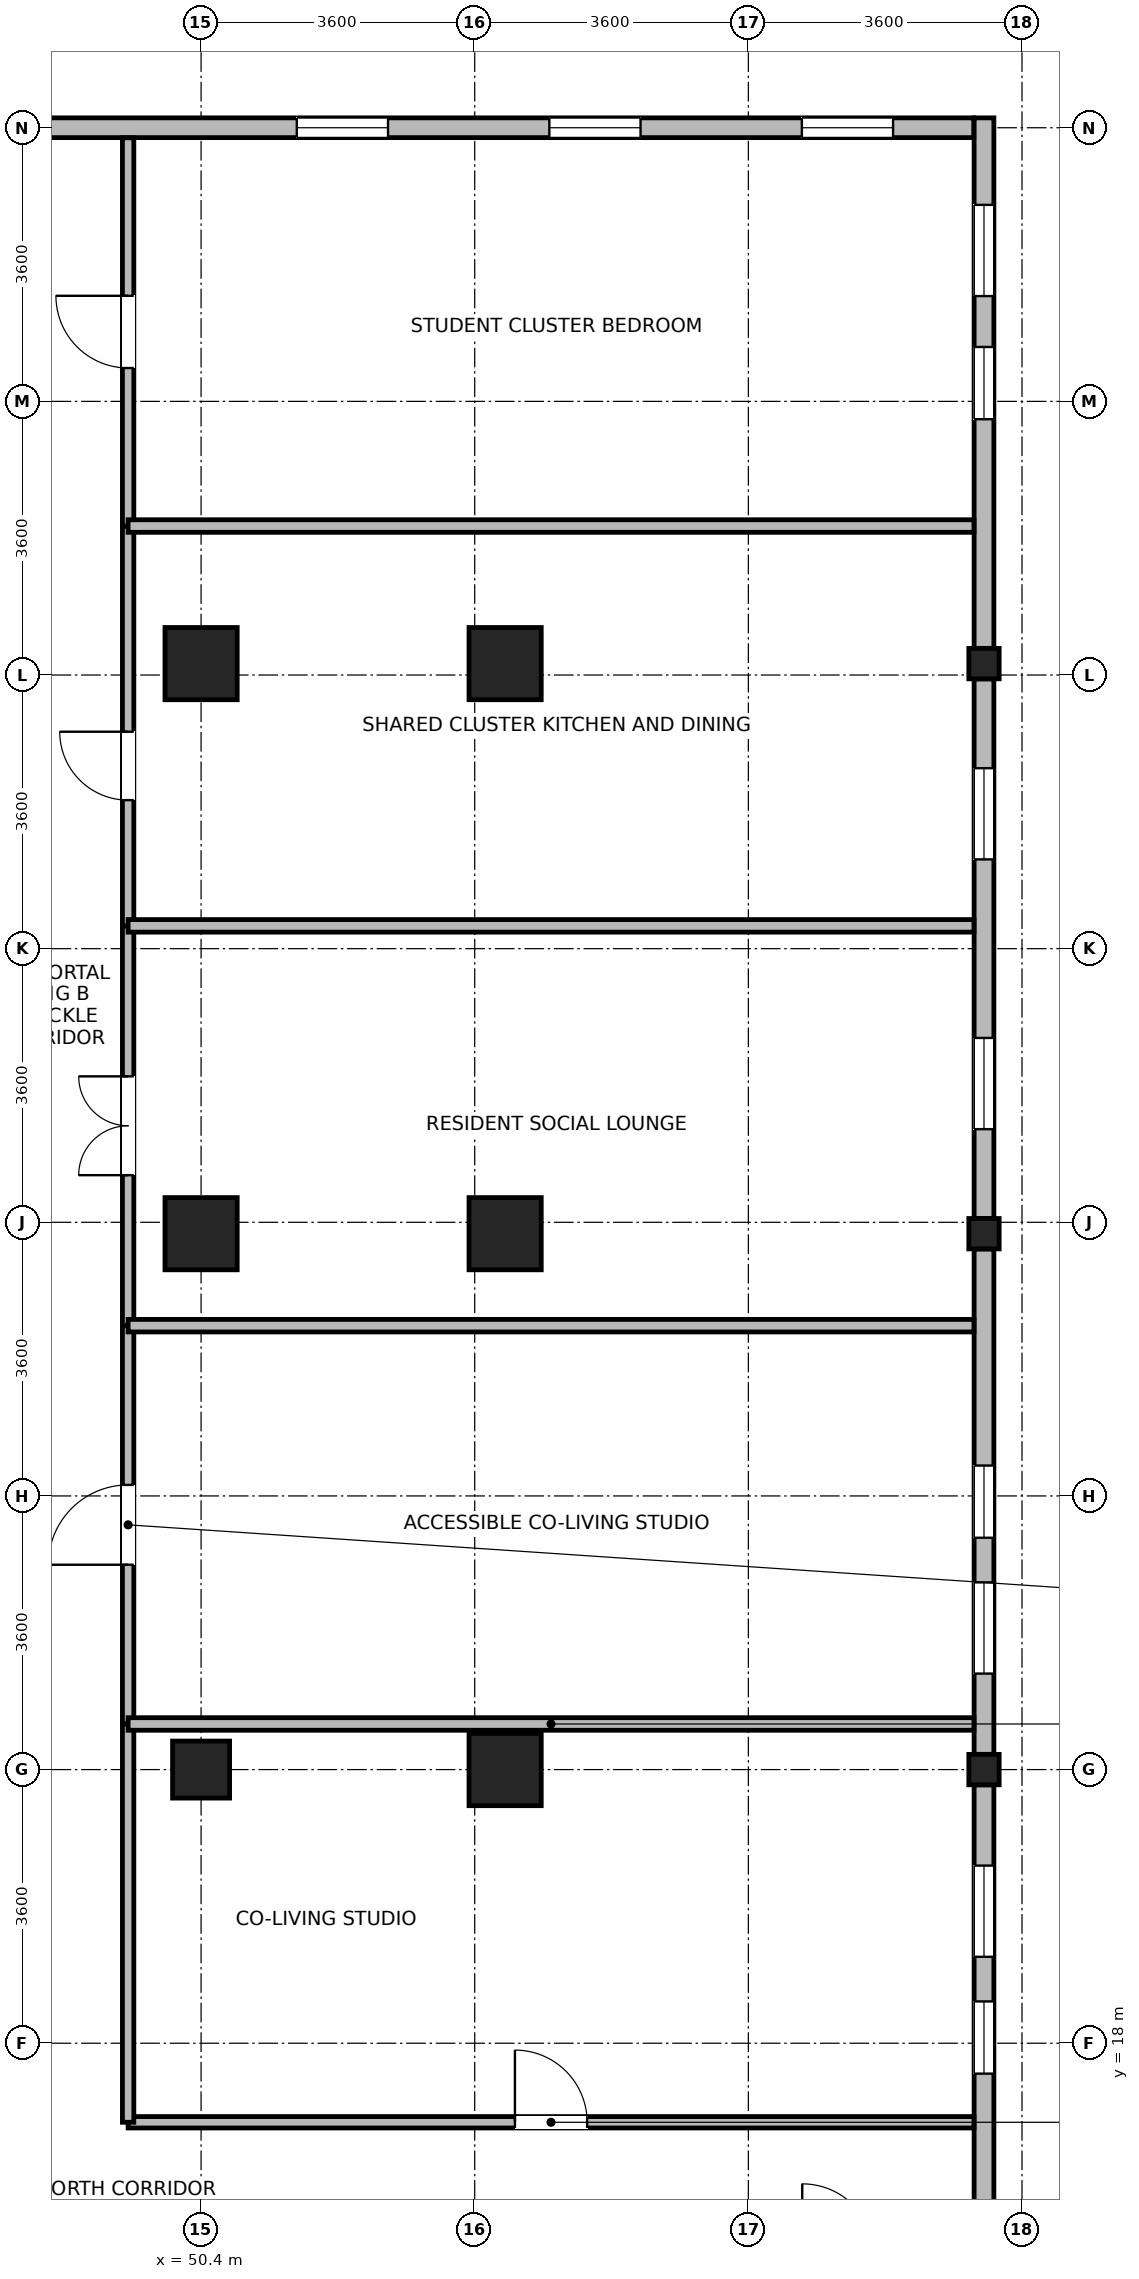
"""IFC4 building model, lengths in metres.
Left out: names, types, materials, properties, quantities, classifications, styles, units other than length and angle.
Written with IfcOpenShell. Run it as: python <this file> out.ifc"""

import sys

from ifc_helpers import new_model, si_unit, direction, frame, frame_2d, origin, origin_2d, place, context, subcontext, project, spatial, rectangle, i_section, extrude, source, transform, mapped, element, fill, save


model = new_model("IFC4")
c1 = context("Model", 3, precision=1e-05, world=origin(), true_north=direction((0.0, 1.0)))
c2 = subcontext(c1, "Body", "Model", "MODEL_VIEW")
j1 = project(units=[si_unit("LENGTHUNIT", "METRE"), si_unit("PLANEANGLEUNIT", "RADIAN")], contexts=[c1])
p1 = place(None, origin())
s1 = spatial("IfcSite", under=j1, at=p1, CompositionType="ELEMENT")
p2 = place(p1, origin())
s2 = spatial("IfcBuilding", under=s1, at=p2, CompositionType="ELEMENT")
p3 = place(p2, frame((0.0, 0.0, 235.1)))
s3 = spatial("IfcBuildingStorey", under=s2, at=p3, CompositionType="ELEMENT", Elevation=235.1)
m1 = source(origin(), c2, "Body", "SweptSolid", [
    extrude(rectangle(XDim=0.75, YDim=0.75, at=origin_2d()), origin(), (0.0, 0.0, 1.0), 3.7),
])
p4 = place(p3, frame((50.4, 21.6, 0.0), z_axis=(0.0, 0.0, 1.0), x_axis=(1.0, 0.0, 0.0)))
e1 = element("IfcColumn", 1, at=p4, inside=s3, PredefinedType="PILASTER", context=c2, shape_type="MappedRepresentation", body=[
    mapped(m1, transform((0.0, 0.0, 0.0), x_axis=(1.0, 0.0, 0.0), y_axis=(0.0, 1.0, 0.0), z_axis=(0.0, 0.0, 1.0), scale=1.0)),
])
m2 = source(origin(), c2, "Body", "SweptSolid", [
    extrude(rectangle(XDim=0.95, YDim=0.95, at=origin_2d()), origin(), (0.0, 0.0, 1.0), 3.7),
])
for number, where, z_axis, x_axis in (
    (2, (50.4, 28.65, 0.0), (0.0, 0.0, 1.0), (1.0, 0.0, 0.0)),
    (3, (50.4, 36.15, 0.0), (0.0, 0.0, 1.0), (1.0, 0.0, 0.0)),
    (4, (54.4, 21.6, 0.0), (0.0, 0.0, 1.0), (1.0, 0.0, 0.0)),
    (5, (54.4, 28.65, 0.0), (0.0, 0.0, 1.0), (1.0, 0.0, 0.0)),
    (6, (54.4, 36.15, 0.0), (0.0, 0.0, 1.0), (1.0, 0.0, 0.0)),
):
    element("IfcColumn", number, at=place(p3, frame(where, z_axis=z_axis, x_axis=x_axis)), inside=s3, PredefinedType="COLUMN", context=c2, shape_type="MappedRepresentation", body=[
        mapped(m2, transform((0.0, 0.0, 0.0), x_axis=(1.0, 0.0, 0.0), y_axis=(0.0, 1.0, 0.0), z_axis=(0.0, 0.0, 1.0), scale=1.0)),
    ])
m3 = source(origin(), c2, "Body", "SweptSolid", [
    extrude(i_section(OverallWidth=0.399, OverallDepth=0.4, WebThickness=0.017, FlangeThickness=0.023, FilletRadius=0.015, at=origin_2d()), origin(), (0.0, 0.0, 1.0), 3.7),
])
for number, where, z_axis, x_axis in (
    (7, (60.7, 21.6, 0.0), (0.0, 0.0, 1.0), (1.0, 0.0, 0.0)),
    (8, (60.7, 28.65, 0.0), (0.0, 0.0, 1.0), (1.0, 0.0, 0.0)),
    (9, (60.7, 36.15, 0.0), (0.0, 0.0, 1.0), (1.0, 0.0, 0.0)),
):
    element("IfcColumn", number, at=place(p3, frame(where, z_axis=z_axis, x_axis=x_axis)), inside=s3, PredefinedType="COLUMN", context=c2, shape_type="MappedRepresentation", body=[
        mapped(m3, transform((0.0, 0.0, 0.0), x_axis=(1.0, 0.0, 0.0), y_axis=(0.0, 1.0, 0.0), z_axis=(0.0, 0.0, 1.0), scale=1.0)),
    ])
p5 = place(p3, frame((60.7, 21.399, 0.0), z_axis=(0.0, 0.0, 1.0), x_axis=(0.0, -1.0, 0.0)))
e10 = element("IfcWall", 10, at=p5, inside=s3, PredefinedType="STANDARD", context=c2, shape_type="SweptSolid", body=[
    extrude(rectangle(XDim=6.648, YDim=0.26, at=frame_2d((3.324, 0.0))), origin(), (0.0, 0.0, 1.0), 3.02),
])
p6 = place(p5, frame((1.062, 0.0, 0.85)))
e11 = element("IfcOpeningElement", 11, at=p6, cuts=e10, PredefinedType="OPENING", context=c2, shape_type="SweptSolid", body=[
    extrude(rectangle(XDim=1.2, YDim=1.75, at=frame_2d((0.6, 0.875))), frame((0.0, 0.14, 0.0), z_axis=(0.0, -1.0, 0.0), x_axis=(1.0, 0.0, 0.0)), (0.0, 0.0, 1.0), 0.28),
])
p7 = place(p5, frame((2.849, 0.0, 0.85)))
e12 = element("IfcOpeningElement", 12, at=p7, cuts=e10, PredefinedType="OPENING", context=c2, shape_type="SweptSolid", body=[
    extrude(rectangle(XDim=0.95, YDim=1.75, at=frame_2d((0.475, 0.875))), frame((0.0, 0.14, 0.0), z_axis=(0.0, -1.0, 0.0), x_axis=(1.0, 0.0, 0.0)), (0.0, 0.0, 1.0), 0.28),
])
p8 = place(p3, frame((60.7, 28.449, 0.0), z_axis=(0.0, 0.0, 1.0), x_axis=(0.0, -1.0, 0.0)))
e13 = element("IfcWall", 13, at=p8, inside=s3, PredefinedType="STANDARD", context=c2, shape_type="SweptSolid", body=[
    extrude(rectangle(XDim=6.648, YDim=0.26, at=frame_2d((3.324, 0.0))), origin(), (0.0, 0.0, 1.0), 3.02),
])
p9 = place(p8, frame((4.386, 0.0, 0.85)))
e14 = element("IfcOpeningElement", 14, at=p9, cuts=e13, PredefinedType="OPENING", context=c2, shape_type="SweptSolid", body=[
    extrude(rectangle(XDim=1.2, YDim=1.75, at=frame_2d((0.6, 0.875))), frame((0.0, 0.14, 0.0), z_axis=(0.0, -1.0, 0.0), x_axis=(1.0, 0.0, 0.0)), (0.0, 0.0, 1.0), 0.28),
])
p10 = place(p8, frame((2.849, 0.0, 0.85)))
e15 = element("IfcOpeningElement", 15, at=p10, cuts=e13, PredefinedType="OPENING", context=c2, shape_type="SweptSolid", body=[
    extrude(rectangle(XDim=0.95, YDim=1.75, at=frame_2d((0.475, 0.875))), frame((0.0, 0.14, 0.0), z_axis=(0.0, -1.0, 0.0), x_axis=(1.0, 0.0, 0.0)), (0.0, 0.0, 1.0), 0.28),
])
p11 = place(p3, frame((60.7, 35.949, 0.0), z_axis=(0.0, 0.0, 1.0), x_axis=(0.0, -1.0, 0.0)))
e16 = element("IfcWall", 16, at=p11, inside=s3, PredefinedType="STANDARD", context=c2, shape_type="SweptSolid", body=[
    extrude(rectangle(XDim=7.098, YDim=0.26, at=frame_2d((3.549, 0.0))), origin(), (0.0, 0.0, 1.0), 3.02),
])
p12 = place(p11, frame((1.175, 0.0, 0.85)))
e17 = element("IfcOpeningElement", 17, at=p12, cuts=e16, PredefinedType="OPENING", context=c2, shape_type="SweptSolid", body=[
    extrude(rectangle(XDim=1.2, YDim=1.75, at=frame_2d((0.6, 0.875))), frame((0.0, 0.14, 0.0), z_axis=(0.0, -1.0, 0.0), x_axis=(1.0, 0.0, 0.0)), (0.0, 0.0, 1.0), 0.28),
])
p13 = place(p11, frame((4.723, 0.0, 0.85)))
e18 = element("IfcOpeningElement", 18, at=p13, cuts=e16, PredefinedType="OPENING", context=c2, shape_type="SweptSolid", body=[
    extrude(rectangle(XDim=1.2, YDim=1.75, at=frame_2d((0.6, 0.875))), frame((0.0, 0.14, 0.0), z_axis=(0.0, -1.0, 0.0), x_axis=(1.0, 0.0, 0.0)), (0.0, 0.0, 1.0), 0.28),
])
p14 = place(p3, frame((60.7, 43.33, 0.0), z_axis=(0.0, 0.0, 1.0), x_axis=(0.0, -1.0, 0.0)))
e19 = element("IfcWall", 19, at=p14, inside=s3, PredefinedType="STANDARD", context=c2, shape_type="SweptSolid", body=[
    extrude(rectangle(XDim=6.979, YDim=0.26, at=frame_2d((3.49, 0.0))), origin(), (0.0, 0.0, 1.0), 3.42),
])
p15 = place(p14, frame((1.145, 0.0, 0.85)))
e20 = element("IfcOpeningElement", 20, at=p15, cuts=e19, PredefinedType="OPENING", context=c2, shape_type="SweptSolid", body=[
    extrude(rectangle(XDim=1.2, YDim=1.75, at=frame_2d((0.6, 0.875))), frame((0.0, 0.14, 0.0), z_axis=(0.0, -1.0, 0.0), x_axis=(1.0, 0.0, 0.0)), (0.0, 0.0, 1.0), 0.28),
])
p16 = place(p14, frame((3.014, 0.0, 0.85)))
e21 = element("IfcOpeningElement", 21, at=p16, cuts=e19, PredefinedType="OPENING", context=c2, shape_type="SweptSolid", body=[
    extrude(rectangle(XDim=0.95, YDim=1.75, at=frame_2d((0.475, 0.875))), frame((0.0, 0.14, 0.0), z_axis=(0.0, -1.0, 0.0), x_axis=(1.0, 0.0, 0.0)), (0.0, 0.0, 1.0), 0.28),
])
p17 = place(p3, frame((47.276, 43.2, 0.0), z_axis=(0.0, 0.0, 1.0), x_axis=(1.0, 0.0, 0.0)))
e22 = element("IfcWall", 22, at=p17, inside=s3, PredefinedType="STANDARD", context=c2, shape_type="SweptSolid", body=[
    extrude(rectangle(XDim=13.289, YDim=0.26, at=frame_2d((6.645, 0.0))), origin(), (0.0, 0.0, 1.0), 3.42),
])
p18 = place(p17, frame((4.383, 0.0, 0.85)))
e23 = element("IfcOpeningElement", 23, at=p18, cuts=e22, PredefinedType="OPENING", context=c2, shape_type="SweptSolid", body=[
    extrude(rectangle(XDim=1.2, YDim=1.75, at=frame_2d((0.6, 0.875))), frame((0.0, 0.14, 0.0), z_axis=(0.0, -1.0, 0.0), x_axis=(1.0, 0.0, 0.0)), (0.0, 0.0, 1.0), 0.28),
])
p19 = place(p17, frame((7.706, 0.0, 0.85)))
e24 = element("IfcOpeningElement", 24, at=p19, cuts=e22, PredefinedType="OPENING", context=c2, shape_type="SweptSolid", body=[
    extrude(rectangle(XDim=1.2, YDim=1.75, at=frame_2d((0.6, 0.875))), frame((0.0, 0.14, 0.0), z_axis=(0.0, -1.0, 0.0), x_axis=(1.0, 0.0, 0.0)), (0.0, 0.0, 1.0), 0.28),
])
p20 = place(p17, frame((11.028, 0.0, 0.85)))
e25 = element("IfcOpeningElement", 25, at=p20, cuts=e22, PredefinedType="OPENING", context=c2, shape_type="SweptSolid", body=[
    extrude(rectangle(XDim=1.2, YDim=1.75, at=frame_2d((0.6, 0.875))), frame((0.0, 0.14, 0.0), z_axis=(0.0, -1.0, 0.0), x_axis=(1.0, 0.0, 0.0)), (0.0, 0.0, 1.0), 0.28),
])
p21 = place(p3, frame((49.44, 16.96, 0.0), z_axis=(0.0, 0.0, 1.0), x_axis=(1.0, 0.0, 0.0)))
e26 = element("IfcWall", 26, at=p21, inside=s3, PredefinedType="PARTITIONING", context=c2, shape_type="SweptSolid", body=[
    extrude(rectangle(XDim=11.128, YDim=0.15, at=frame_2d((5.564, 0.0))), origin(), (0.0, 0.0, 1.0), 3.42),
])
p22 = place(p21, frame((5.089, 0.0, 0.0)))
e27 = element("IfcOpeningElement", 27, at=p22, cuts=e26, PredefinedType="OPENING", context=c2, shape_type="SweptSolid", body=[
    extrude(rectangle(XDim=0.95, YDim=2.1, at=frame_2d((0.475, 1.05))), frame((0.0, 0.085, 0.0), z_axis=(0.0, -1.0, 0.0), x_axis=(1.0, 0.0, 0.0)), (0.0, 0.0, 1.0), 0.17),
])
p23 = place(p3, frame((49.44, 27.44, 0.0), z_axis=(0.0, 0.0, 1.0), x_axis=(0.0, 1.0, 0.0)))
e28 = element("IfcWall", 28, at=p23, inside=s3, PredefinedType="PARTITIONING", context=c2, shape_type="SweptSolid", body=[
    extrude(rectangle(XDim=5.26, YDim=0.15, at=frame_2d((2.63, 0.0))), origin(), (0.0, 0.0, 1.0), 3.42),
])
p24 = place(p23, frame((1.98, 0.0, 0.0)))
e29 = element("IfcOpeningElement", 29, at=p24, cuts=e28, PredefinedType="OPENING", context=c2, shape_type="SweptSolid", body=[
    extrude(rectangle(XDim=1.3, YDim=2.12, at=frame_2d((0.65, 1.06))), frame((0.0, 0.085, 0.0), z_axis=(0.0, -1.0, 0.0), x_axis=(1.0, 0.0, 0.0)), (0.0, 0.0, 1.0), 0.17),
])
p25 = place(p3, frame((49.44, 32.7, 0.0), z_axis=(0.0, 0.0, 1.0), x_axis=(0.0, 1.0, 0.0)))
e30 = element("IfcWall", 30, at=p25, inside=s3, PredefinedType="PARTITIONING", context=c2, shape_type="SweptSolid", body=[
    extrude(rectangle(XDim=5.26, YDim=0.15, at=frame_2d((2.63, 0.0))), origin(), (0.0, 0.0, 1.0), 3.42),
])
p26 = place(p25, frame((1.654, 0.0, 0.0)))
e31 = element("IfcOpeningElement", 31, at=p26, cuts=e30, PredefinedType="OPENING", context=c2, shape_type="SweptSolid", body=[
    extrude(rectangle(XDim=0.9, YDim=2.08, at=frame_2d((0.45, 1.04))), frame((0.0, 0.085, 0.0), z_axis=(0.0, -1.0, 0.0), x_axis=(1.0, 0.0, 0.0)), (0.0, 0.0, 1.0), 0.17),
])
p27 = place(p3, frame((49.44, 22.2, 0.0), z_axis=(0.0, 0.0, 1.0), x_axis=(0.0, 1.0, 0.0)))
e32 = element("IfcWall", 32, at=p27, inside=s3, PredefinedType="PARTITIONING", context=c2, shape_type="SweptSolid", body=[
    extrude(rectangle(XDim=5.24, YDim=0.15, at=frame_2d((2.62, 0.0))), origin(), (0.0, 0.0, 1.0), 3.42),
])
p28 = place(p27, frame((2.095, 0.0, 0.0)))
e33 = element("IfcOpeningElement", 33, at=p28, cuts=e32, PredefinedType="OPENING", context=c2, shape_type="SweptSolid", body=[
    extrude(rectangle(XDim=1.05, YDim=2.12, at=frame_2d((0.525, 1.06))), frame((0.0, 0.085, 0.0), z_axis=(0.0, -1.0, 0.0), x_axis=(1.0, 0.0, 0.0)), (0.0, 0.0, 1.0), 0.17),
])
p29 = place(p3, frame((49.44, 37.96, 0.0), z_axis=(0.0, 0.0, 1.0), x_axis=(0.0, 1.0, 0.0)))
e34 = element("IfcWall", 34, at=p29, inside=s3, PredefinedType="PARTITIONING", context=c2, shape_type="SweptSolid", body=[
    extrude(rectangle(XDim=5.108, YDim=0.15, at=frame_2d((2.554, 0.0))), origin(), (0.0, 0.0, 1.0), 3.42),
])
p30 = place(p29, frame((2.079, 0.0, 0.0)))
e35 = element("IfcOpeningElement", 35, at=p30, cuts=e34, PredefinedType="OPENING", context=c2, shape_type="SweptSolid", body=[
    extrude(rectangle(XDim=0.95, YDim=2.1, at=frame_2d((0.475, 1.05))), frame((0.0, 0.085, 0.0), z_axis=(0.0, -1.0, 0.0), x_axis=(1.0, 0.0, 0.0)), (0.0, 0.0, 1.0), 0.17),
])
p31 = place(p3, frame((49.44, 16.96, 0.0), z_axis=(0.0, 0.0, 1.0), x_axis=(0.0, 1.0, 0.0)))
e36 = element("IfcWall", 36, at=p31, inside=s3, PredefinedType="PARTITIONING", context=c2, shape_type="SweptSolid", body=[
    extrude(rectangle(XDim=5.24, YDim=0.15, at=frame_2d((2.62, 0.0))), origin(), (0.0, 0.0, 1.0), 3.42),
])
for number, where, z_axis, x_axis in (
    (37, (49.44, 22.2, 0.0), (0.0, 0.0, 1.0), (1.0, 0.0, 0.0)),
    (38, (49.44, 27.44, 0.0), (0.0, 0.0, 1.0), (1.0, 0.0, 0.0)),
    (39, (49.44, 32.7, 0.0), (0.0, 0.0, 1.0), (1.0, 0.0, 0.0)),
    (40, (49.44, 37.96, 0.0), (0.0, 0.0, 1.0), (1.0, 0.0, 0.0)),
):
    element("IfcWall", number, at=place(p3, frame(where, z_axis=z_axis, x_axis=x_axis)), inside=s3, PredefinedType="PARTITIONING", context=c2, shape_type="SweptSolid", body=[
        extrude(rectangle(XDim=11.128, YDim=0.165, at=frame_2d((5.564, 0.0))), origin(), (0.0, 0.0, 1.0), 3.42),
    ])
p32 = place(p6, origin())
e41 = element("IfcWindow", 41, at=p32, inside=s3, PartitioningType="SINGLE_PANEL", PredefinedType="WINDOW", context=c2, shape_type="SweptSolid", body=[
    extrude(rectangle(XDim=1.2, YDim=1.75, at=frame_2d((0.6, 0.875))), frame((0.0, 0.03, 0.0), z_axis=(0.0, -1.0, 0.0), x_axis=(1.0, 0.0, 0.0)), (0.0, 0.0, 1.0), 0.06),
])
fill(e11, e41)
p33 = place(p7, origin())
e42 = element("IfcWindow", 42, at=p33, inside=s3, PartitioningType="SINGLE_PANEL", PredefinedType="WINDOW", context=c2, shape_type="SweptSolid", body=[
    extrude(rectangle(XDim=0.95, YDim=1.75, at=frame_2d((0.475, 0.875))), frame((0.0, 0.03, 0.0), z_axis=(0.0, -1.0, 0.0), x_axis=(1.0, 0.0, 0.0)), (0.0, 0.0, 1.0), 0.06),
])
fill(e12, e42)
p34 = place(p9, origin())
e43 = element("IfcWindow", 43, at=p34, inside=s3, PartitioningType="SINGLE_PANEL", PredefinedType="WINDOW", context=c2, shape_type="SweptSolid", body=[
    extrude(rectangle(XDim=1.2, YDim=1.75, at=frame_2d((0.6, 0.875))), frame((0.0, 0.03, 0.0), z_axis=(0.0, -1.0, 0.0), x_axis=(1.0, 0.0, 0.0)), (0.0, 0.0, 1.0), 0.06),
])
fill(e14, e43)
p35 = place(p10, origin())
e44 = element("IfcWindow", 44, at=p35, inside=s3, PartitioningType="SINGLE_PANEL", PredefinedType="WINDOW", context=c2, shape_type="SweptSolid", body=[
    extrude(rectangle(XDim=0.95, YDim=1.75, at=frame_2d((0.475, 0.875))), frame((0.0, 0.03, 0.0), z_axis=(0.0, -1.0, 0.0), x_axis=(1.0, 0.0, 0.0)), (0.0, 0.0, 1.0), 0.06),
])
fill(e15, e44)
p36 = place(p12, origin())
e45 = element("IfcWindow", 45, at=p36, inside=s3, PartitioningType="SINGLE_PANEL", PredefinedType="WINDOW", context=c2, shape_type="SweptSolid", body=[
    extrude(rectangle(XDim=1.2, YDim=1.75, at=frame_2d((0.6, 0.875))), frame((0.0, 0.03, 0.0), z_axis=(0.0, -1.0, 0.0), x_axis=(1.0, 0.0, 0.0)), (0.0, 0.0, 1.0), 0.06),
])
fill(e17, e45)
p37 = place(p13, origin())
e46 = element("IfcWindow", 46, at=p37, inside=s3, PartitioningType="SINGLE_PANEL", PredefinedType="WINDOW", context=c2, shape_type="SweptSolid", body=[
    extrude(rectangle(XDim=1.2, YDim=1.75, at=frame_2d((0.6, 0.875))), frame((0.0, 0.03, 0.0), z_axis=(0.0, -1.0, 0.0), x_axis=(1.0, 0.0, 0.0)), (0.0, 0.0, 1.0), 0.06),
])
fill(e18, e46)
p38 = place(p15, origin())
e47 = element("IfcWindow", 47, at=p38, inside=s3, PartitioningType="SINGLE_PANEL", PredefinedType="WINDOW", context=c2, shape_type="SweptSolid", body=[
    extrude(rectangle(XDim=1.2, YDim=1.75, at=frame_2d((0.6, 0.875))), frame((0.0, 0.03, 0.0), z_axis=(0.0, -1.0, 0.0), x_axis=(1.0, 0.0, 0.0)), (0.0, 0.0, 1.0), 0.06),
])
fill(e20, e47)
p39 = place(p16, origin())
e48 = element("IfcWindow", 48, at=p39, inside=s3, PartitioningType="SINGLE_PANEL", PredefinedType="WINDOW", context=c2, shape_type="SweptSolid", body=[
    extrude(rectangle(XDim=0.95, YDim=1.75, at=frame_2d((0.475, 0.875))), frame((0.0, 0.03, 0.0), z_axis=(0.0, -1.0, 0.0), x_axis=(1.0, 0.0, 0.0)), (0.0, 0.0, 1.0), 0.06),
])
fill(e21, e48)
p40 = place(p18, origin())
e49 = element("IfcWindow", 49, at=p40, inside=s3, PartitioningType="SINGLE_PANEL", PredefinedType="WINDOW", context=c2, shape_type="SweptSolid", body=[
    extrude(rectangle(XDim=1.2, YDim=1.75, at=frame_2d((0.6, 0.875))), frame((0.0, 0.03, 0.0), z_axis=(0.0, -1.0, 0.0), x_axis=(1.0, 0.0, 0.0)), (0.0, 0.0, 1.0), 0.06),
])
fill(e23, e49)
p41 = place(p19, origin())
e50 = element("IfcWindow", 50, at=p41, inside=s3, PartitioningType="SINGLE_PANEL", PredefinedType="WINDOW", context=c2, shape_type="SweptSolid", body=[
    extrude(rectangle(XDim=1.2, YDim=1.75, at=frame_2d((0.6, 0.875))), frame((0.0, 0.03, 0.0), z_axis=(0.0, -1.0, 0.0), x_axis=(1.0, 0.0, 0.0)), (0.0, 0.0, 1.0), 0.06),
])
fill(e24, e50)
p42 = place(p20, origin())
e51 = element("IfcWindow", 51, at=p42, inside=s3, PartitioningType="SINGLE_PANEL", PredefinedType="WINDOW", context=c2, shape_type="SweptSolid", body=[
    extrude(rectangle(XDim=1.2, YDim=1.75, at=frame_2d((0.6, 0.875))), frame((0.0, 0.03, 0.0), z_axis=(0.0, -1.0, 0.0), x_axis=(1.0, 0.0, 0.0)), (0.0, 0.0, 1.0), 0.06),
])
fill(e25, e51)
p43 = place(p22, origin())
e52 = element("IfcDoor", 52, at=p43, inside=s3, OperationType="SINGLE_SWING_LEFT", PredefinedType="DOOR", context=c2, shape_type="SweptSolid", body=[
    extrude(rectangle(XDim=0.95, YDim=2.1, at=frame_2d((0.475, 1.05))), frame((0.0, 0.025, 0.0), z_axis=(0.0, -1.0, 0.0), x_axis=(1.0, 0.0, 0.0)), (0.0, 0.0, 1.0), 0.05),
])
fill(e27, e52)
p44 = place(p24, origin())
e53 = element("IfcDoor", 53, at=p44, inside=s3, OperationType="DOUBLE_DOOR_SINGLE_SWING", PredefinedType="DOOR", context=c2, shape_type="SweptSolid", body=[
    extrude(rectangle(XDim=1.3, YDim=2.12, at=frame_2d((0.65, 1.06))), frame((0.0, 0.025, 0.0), z_axis=(0.0, -1.0, 0.0), x_axis=(1.0, 0.0, 0.0)), (0.0, 0.0, 1.0), 0.05),
])
fill(e29, e53)
p45 = place(p26, origin())
e54 = element("IfcDoor", 54, at=p45, inside=s3, OperationType="SINGLE_SWING_RIGHT", PredefinedType="DOOR", context=c2, shape_type="SweptSolid", body=[
    extrude(rectangle(XDim=0.9, YDim=2.08, at=frame_2d((0.45, 1.04))), frame((0.0, 0.025, 0.0), z_axis=(0.0, -1.0, 0.0), x_axis=(1.0, 0.0, 0.0)), (0.0, 0.0, 1.0), 0.05),
])
fill(e31, e54)
p46 = place(p28, origin())
e55 = element("IfcDoor", 55, at=p46, inside=s3, OperationType="SINGLE_SWING_LEFT", PredefinedType="DOOR", context=c2, shape_type="SweptSolid", body=[
    extrude(rectangle(XDim=1.05, YDim=2.12, at=frame_2d((0.525, 1.06))), frame((0.0, 0.025, 0.0), z_axis=(0.0, -1.0, 0.0), x_axis=(1.0, 0.0, 0.0)), (0.0, 0.0, 1.0), 0.05),
])
fill(e33, e55)
p47 = place(p30, origin())
e56 = element("IfcDoor", 56, at=p47, inside=s3, OperationType="SINGLE_SWING_RIGHT", PredefinedType="DOOR", context=c2, shape_type="SweptSolid", body=[
    extrude(rectangle(XDim=0.95, YDim=2.1, at=frame_2d((0.475, 1.05))), frame((0.0, 0.025, 0.0), z_axis=(0.0, -1.0, 0.0), x_axis=(1.0, 0.0, 0.0)), (0.0, 0.0, 1.0), 0.05),
])
fill(e35, e56)
save(model, sys.argv[1])
